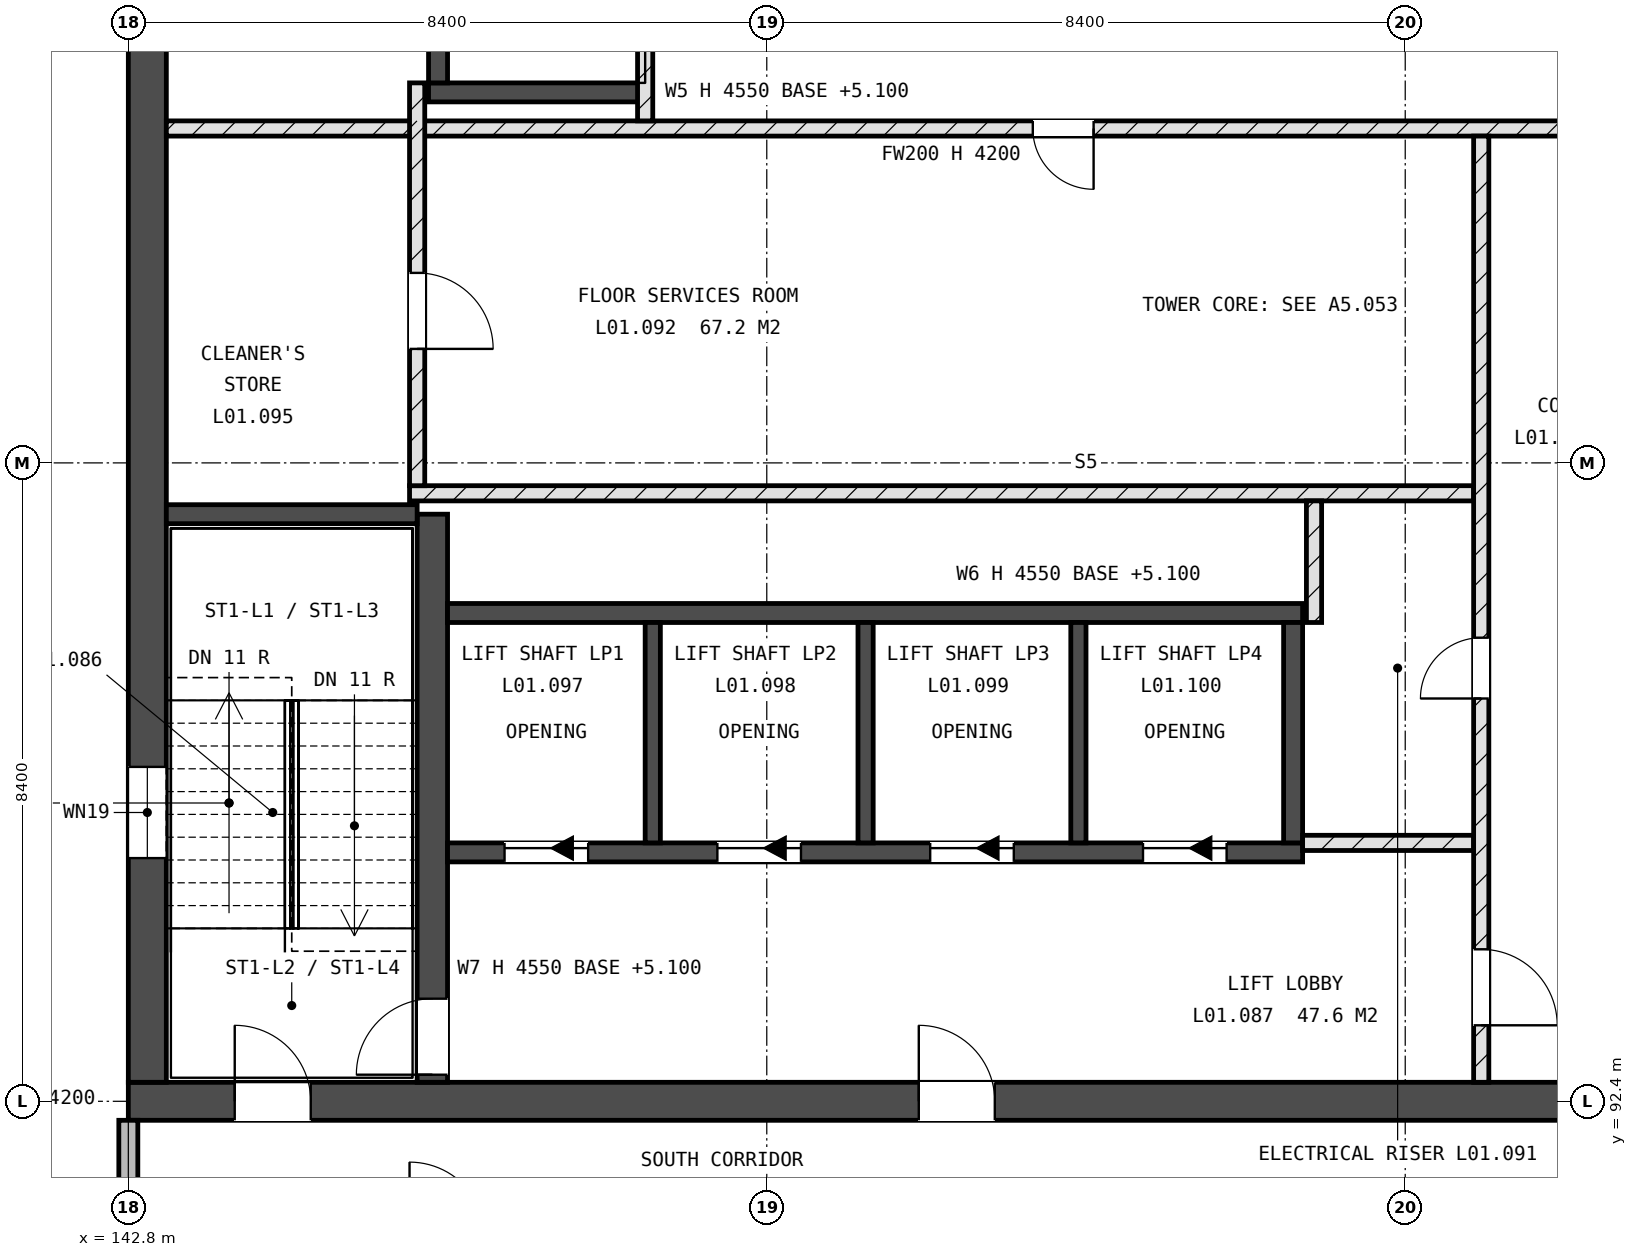
"""IFC4 building model, lengths in metres.
Left out: names, types, materials, properties, quantities, classifications, styles, units other than length and angle.
Written with IfcOpenShell. Run it as: python <this file> out.ifc"""

import sys

from ifc_helpers import new_model, si_unit, direction, frame, frame_2d, origin, place, context, subcontext, project, spatial, rectangle, extrude, element, fill, save


model = new_model("IFC4")
c1 = context("Model", 3, precision=1e-05, world=origin(), true_north=direction((0.0, 1.0)))
c2 = subcontext(c1, "Body", "Model", "MODEL_VIEW")
j1 = project(units=[si_unit("LENGTHUNIT", "METRE"), si_unit("PLANEANGLEUNIT", "RADIAN")], contexts=[c1])
p1 = place(None, origin())
s1 = spatial("IfcSite", under=j1, at=p1, CompositionType="ELEMENT")
p2 = place(p1, origin())
s2 = spatial("IfcBuilding", under=s1, at=p2, CompositionType="ELEMENT")
p3 = place(p2, frame((0.0, 0.0, 5.4)))
s3 = spatial("IfcBuildingStorey", under=s2, at=p3, CompositionType="ELEMENT", Elevation=5.4)
p4 = place(p3, frame((142.8, 92.4, -0.3), z_axis=(0.0, 0.0, 1.0), x_axis=(1.0, 0.0, 0.0)))
e1 = element("IfcWall", 1, at=p4, inside=s3, PredefinedType="SHEAR", context=c2, shape_type="SweptSolid", body=[
    extrude(rectangle(XDim=25.2, YDim=0.5, at=frame_2d((12.6, 0.0))), origin(), (0.0, 0.0, 1.0), 4.55),
])
p5 = place(p4, frame((1.4, 0.0, 0.3)))
e2 = element("IfcOpeningElement", 2, at=p5, cuts=e1, PredefinedType="OPENING", context=c2, shape_type="SweptSolid", body=[
    extrude(rectangle(XDim=1.0, YDim=2.1, at=frame_2d((0.5, 1.05))), frame((0.0, 0.26, 0.0), z_axis=(0.0, -1.0, 0.0), x_axis=(1.0, 0.0, 0.0)), (0.0, 0.0, 1.0), 0.52),
])
p6 = place(p4, frame((19.1, 0.0, 0.3)))
e3 = element("IfcOpeningElement", 3, at=p6, cuts=e1, PredefinedType="OPENING", context=c2, shape_type="SweptSolid", body=[
    extrude(rectangle(XDim=1.0, YDim=2.1, at=frame_2d((0.5, 1.05))), frame((0.0, 0.26, 0.0), z_axis=(0.0, -1.0, 0.0), x_axis=(1.0, 0.0, 0.0)), (0.0, 0.0, 1.0), 0.52),
])
p7 = place(p4, frame((10.4, 0.0, 0.3)))
e4 = element("IfcOpeningElement", 4, at=p7, cuts=e1, PredefinedType="OPENING", context=c2, shape_type="SweptSolid", body=[
    extrude(rectangle(XDim=1.0, YDim=2.1, at=frame_2d((0.5, 1.05))), frame((0.0, 0.26, 0.0), z_axis=(0.0, -1.0, 0.0), x_axis=(1.0, 0.0, 0.0)), (0.0, 0.0, 1.0), 0.52),
])
p8 = place(p3, frame((143.05, 92.65, -0.3), z_axis=(0.0, 0.0, 1.0), x_axis=(0.0, 1.0, 0.0)))
e5 = element("IfcWall", 5, at=p8, inside=s3, PredefinedType="SHEAR", context=c2, shape_type="SweptSolid", body=[
    extrude(rectangle(XDim=16.3, YDim=0.5, at=frame_2d((8.15, 0.0))), origin(), (0.0, 0.0, 1.0), 4.55),
])
p9 = place(p8, frame((2.95, 0.0, 1.9)))
e6 = element("IfcOpeningElement", 6, at=p9, cuts=e5, PredefinedType="OPENING", context=c2, shape_type="SweptSolid", body=[
    extrude(rectangle(XDim=1.2, YDim=0.9, at=frame_2d((0.6, 0.45))), frame((0.0, 0.26, 0.0), z_axis=(0.0, -1.0, 0.0), x_axis=(1.0, 0.0, 0.0)), (0.0, 0.0, 1.0), 0.52),
])
p10 = place(p3, frame((146.8, 92.65, -0.3), z_axis=(0.0, 0.0, 1.0), x_axis=(0.0, 1.0, 0.0)))
e7 = element("IfcWall", 7, at=p10, inside=s3, PredefinedType="SHEAR", context=c2, shape_type="SweptSolid", body=[
    extrude(rectangle(XDim=7.475, YDim=0.4, at=frame_2d((3.738, 0.0))), origin(), (0.0, 0.0, 1.0), 4.55),
])
p11 = place(p10, frame((0.1, 0.0, 0.3)))
e8 = element("IfcOpeningElement", 8, at=p11, cuts=e7, PredefinedType="OPENING", context=c2, shape_type="SweptSolid", body=[
    extrude(rectangle(XDim=1.0, YDim=2.1, at=frame_2d((0.5, 1.05))), frame((0.0, 0.21, 0.0), z_axis=(0.0, -1.0, 0.0), x_axis=(1.0, 0.0, 0.0)), (0.0, 0.0, 1.0), 0.42),
])
p12 = place(p3, frame((143.3, 100.125, -0.3), z_axis=(0.0, 0.0, 1.0), x_axis=(1.0, 0.0, 0.0)))
e9 = element("IfcWall", 9, at=p12, inside=s3, PredefinedType="SHEAR", context=c2, shape_type="SweptSolid", body=[
    extrude(rectangle(XDim=3.3, YDim=0.25, at=frame_2d((1.65, 0.0))), origin(), (0.0, 0.0, 1.0), 4.55),
])
p13 = place(p3, frame((147.0, 95.675, -0.3), z_axis=(0.0, 0.0, 1.0), x_axis=(1.0, 0.0, 0.0)))
e10 = element("IfcWall", 10, at=p13, inside=s3, PredefinedType="SHEAR", context=c2, shape_type="SweptSolid", body=[
    extrude(rectangle(XDim=11.25, YDim=0.25, at=frame_2d((5.625, 0.0))), origin(), (0.0, 0.0, 1.0), 4.55),
])
p14 = place(p13, frame((0.75, 0.0, 0.3)))
e11 = element("IfcOpeningElement", 11, at=p14, cuts=e10, PredefinedType="OPENING", context=c2, shape_type="SweptSolid", body=[
    extrude(rectangle(XDim=1.1, YDim=2.1, at=frame_2d((0.55, 1.05))), frame((0.0, 0.135, 0.0), z_axis=(0.0, -1.0, 0.0), x_axis=(1.0, 0.0, 0.0)), (0.0, 0.0, 1.0), 0.27),
])
p15 = place(p13, frame((3.55, 0.0, 0.3)))
e12 = element("IfcOpeningElement", 12, at=p15, cuts=e10, PredefinedType="OPENING", context=c2, shape_type="SweptSolid", body=[
    extrude(rectangle(XDim=1.1, YDim=2.1, at=frame_2d((0.55, 1.05))), frame((0.0, 0.135, 0.0), z_axis=(0.0, -1.0, 0.0), x_axis=(1.0, 0.0, 0.0)), (0.0, 0.0, 1.0), 0.27),
])
p16 = place(p13, frame((6.35, 0.0, 0.3)))
e13 = element("IfcOpeningElement", 13, at=p16, cuts=e10, PredefinedType="OPENING", context=c2, shape_type="SweptSolid", body=[
    extrude(rectangle(XDim=1.1, YDim=2.1, at=frame_2d((0.55, 1.05))), frame((0.0, 0.135, 0.0), z_axis=(0.0, -1.0, 0.0), x_axis=(1.0, 0.0, 0.0)), (0.0, 0.0, 1.0), 0.27),
])
p17 = place(p13, frame((9.15, 0.0, 0.3)))
e14 = element("IfcOpeningElement", 14, at=p17, cuts=e10, PredefinedType="OPENING", context=c2, shape_type="SweptSolid", body=[
    extrude(rectangle(XDim=1.1, YDim=2.1, at=frame_2d((0.55, 1.05))), frame((0.0, 0.135, 0.0), z_axis=(0.0, -1.0, 0.0), x_axis=(1.0, 0.0, 0.0)), (0.0, 0.0, 1.0), 0.27),
])
p18 = place(p3, frame((147.0, 98.825, -0.3), z_axis=(0.0, 0.0, 1.0), x_axis=(1.0, 0.0, 0.0)))
e15 = element("IfcWall", 15, at=p18, inside=s3, PredefinedType="SHEAR", context=c2, shape_type="SweptSolid", body=[
    extrude(rectangle(XDim=11.25, YDim=0.25, at=frame_2d((5.625, 0.0))), origin(), (0.0, 0.0, 1.0), 4.55),
])
p19 = place(p3, frame((158.125, 95.8, -0.3), z_axis=(0.0, 0.0, 1.0), x_axis=(0.0, 1.0, 0.0)))
e16 = element("IfcWall", 16, at=p19, inside=s3, PredefinedType="SHEAR", context=c2, shape_type="SweptSolid", body=[
    extrude(rectangle(XDim=2.9, YDim=0.25, at=frame_2d((1.45, 0.0))), origin(), (0.0, 0.0, 1.0), 4.55),
])
for number, where, z_axis, x_axis in (
    (17, (149.7, 95.8, -0.3), (0.0, 0.0, 1.0), (0.0, 1.0, 0.0)),
    (18, (152.5, 95.8, -0.3), (0.0, 0.0, 1.0), (0.0, 1.0, 0.0)),
    (19, (155.3, 95.8, -0.3), (0.0, 0.0, 1.0), (0.0, 1.0, 0.0)),
):
    element("IfcWall", number, at=place(p3, frame(where, z_axis=z_axis, x_axis=x_axis)), inside=s3, PredefinedType="SHEAR", context=c2, shape_type="SweptSolid", body=[
        extrude(rectangle(XDim=2.9, YDim=0.2, at=frame_2d((1.45, 0.0))), origin(), (0.0, 0.0, 1.0), 4.55),
    ])
p20 = place(p3, frame((146.75, 105.675, -0.3), z_axis=(0.0, 0.0, 1.0), x_axis=(1.0, 0.0, 0.0)))
e20 = element("IfcWall", 20, at=p20, inside=s3, PredefinedType="SHEAR", context=c2, shape_type="SweptSolid", body=[
    extrude(rectangle(XDim=2.85, YDim=0.25, at=frame_2d((1.425, 0.0))), origin(), (0.0, 0.0, 1.0), 4.55),
])
p21 = place(p3, frame((146.875, 105.8, -0.3), z_axis=(0.0, 0.0, 1.0), x_axis=(0.0, 1.0, 0.0)))
e21 = element("IfcWall", 21, at=p21, inside=s3, PredefinedType="SHEAR", context=c2, shape_type="SweptSolid", body=[
    extrude(rectangle(XDim=2.9, YDim=0.25, at=frame_2d((1.45, 0.0))), origin(), (0.0, 0.0, 1.0), 4.55),
])
p22 = place(p3, frame((142.8, 84.55, 0.0), z_axis=(0.0, 0.0, 1.0), x_axis=(0.0, 1.0, 0.0)))
e22 = element("IfcWall", 22, at=p22, inside=s3, PredefinedType="STANDARD", context=c2, shape_type="SweptSolid", body=[
    extrude(rectangle(XDim=7.6, YDim=0.25, at=frame_2d((3.8, 0.0))), origin(), (0.0, 0.0, 1.0), 4.2),
])
p23 = place(p22, frame((2.15, 0.0, 2.1)))
e23 = element("IfcOpeningElement", 23, at=p23, cuts=e22, PredefinedType="OPENING", context=c2, shape_type="SweptSolid", body=[
    extrude(rectangle(XDim=0.9, YDim=0.6, at=frame_2d((0.45, 0.3))), frame((0.0, 0.135, 0.0), z_axis=(0.0, -1.0, 0.0), x_axis=(1.0, 0.0, 0.0)), (0.0, 0.0, 1.0), 0.27),
])
p24 = place(p3, frame((158.25, 95.8, 0.0), z_axis=(0.0, 0.0, 1.0), x_axis=(1.0, 0.0, 0.0)))
e24 = element("IfcWall", 24, at=p24, inside=s3, PredefinedType="SOLIDWALL", context=c2, shape_type="SweptSolid", body=[
    extrude(rectangle(XDim=2.25, YDim=0.2, at=frame_2d((1.125, 0.0))), origin(), (0.0, 0.0, 1.0), 4.2),
])
p25 = place(p3, frame((146.5, 100.4, 0.0), z_axis=(0.0, 0.0, 1.0), x_axis=(1.0, 0.0, 0.0)))
e25 = element("IfcWall", 25, at=p25, inside=s3, PredefinedType="SOLIDWALL", context=c2, shape_type="SweptSolid", body=[
    extrude(rectangle(XDim=14.0, YDim=0.2, at=frame_2d((7.0, 0.0))), origin(), (0.0, 0.0, 1.0), 4.2),
])
p26 = place(p3, frame((143.3, 105.2, 0.0), z_axis=(0.0, 0.0, 1.0), x_axis=(1.0, 0.0, 0.0)))
e26 = element("IfcWall", 26, at=p26, inside=s3, PredefinedType="SOLIDWALL", context=c2, shape_type="SweptSolid", body=[
    extrude(rectangle(XDim=20.65, YDim=0.2, at=frame_2d((10.325, 0.0))), origin(), (0.0, 0.0, 1.0), 4.2),
])
p27 = place(p26, frame((11.4, 0.0, 0.0)))
e27 = element("IfcOpeningElement", 27, at=p27, cuts=e26, PredefinedType="OPENING", context=c2, shape_type="SweptSolid", body=[
    extrude(rectangle(XDim=0.8, YDim=2.1, at=frame_2d((0.4, 1.05))), frame((0.0, 0.11, 0.0), z_axis=(0.0, -1.0, 0.0), x_axis=(1.0, 0.0, 0.0)), (0.0, 0.0, 1.0), 0.22),
])
p28 = place(p26, frame((18.7, 0.0, 0.0)))
e28 = element("IfcOpeningElement", 28, at=p28, cuts=e26, PredefinedType="OPENING", context=c2, shape_type="SweptSolid", body=[
    extrude(rectangle(XDim=1.0, YDim=2.1, at=frame_2d((0.5, 1.05))), frame((0.0, 0.11, 0.0), z_axis=(0.0, -1.0, 0.0), x_axis=(1.0, 0.0, 0.0)), (0.0, 0.0, 1.0), 0.22),
])
p29 = place(p3, frame((146.6, 100.5, 0.0), z_axis=(0.0, 0.0, 1.0), x_axis=(0.0, 1.0, 0.0)))
e29 = element("IfcWall", 29, at=p29, inside=s3, PredefinedType="SOLIDWALL", context=c2, shape_type="SweptSolid", body=[
    extrude(rectangle(XDim=5.3, YDim=0.2, at=frame_2d((2.65, 0.0))), origin(), (0.0, 0.0, 1.0), 4.2),
])
p30 = place(p29, frame((1.8, 0.0, 0.0)))
e30 = element("IfcOpeningElement", 30, at=p30, cuts=e29, PredefinedType="OPENING", context=c2, shape_type="SweptSolid", body=[
    extrude(rectangle(XDim=1.0, YDim=2.1, at=frame_2d((0.5, 1.05))), frame((0.0, 0.11, 0.0), z_axis=(0.0, -1.0, 0.0), x_axis=(1.0, 0.0, 0.0)), (0.0, 0.0, 1.0), 0.22),
])
p31 = place(p3, frame((149.6, 105.3, 0.0), z_axis=(0.0, 0.0, 1.0), x_axis=(0.0, 1.0, 0.0)))
e31 = element("IfcWall", 31, at=p31, inside=s3, PredefinedType="SOLIDWALL", context=c2, shape_type="SweptSolid", body=[
    extrude(rectangle(XDim=3.65, YDim=0.2, at=frame_2d((1.825, 0.0))), origin(), (0.0, 0.0, 1.0), 4.2),
])
p32 = place(p31, frame((1.4, 0.0, 0.0)))
e32 = element("IfcOpeningElement", 32, at=p32, cuts=e31, PredefinedType="OPENING", context=c2, shape_type="SweptSolid", body=[
    extrude(rectangle(XDim=1.1, YDim=2.1, at=frame_2d((0.55, 1.05))), frame((0.0, 0.11, 0.0), z_axis=(0.0, -1.0, 0.0), x_axis=(1.0, 0.0, 0.0)), (0.0, 0.0, 1.0), 0.22),
])
p33 = place(p3, frame((158.4, 98.7, 0.0), z_axis=(0.0, 0.0, 1.0), x_axis=(0.0, 1.0, 0.0)))
e33 = element("IfcWall", 33, at=p33, inside=s3, PredefinedType="SOLIDWALL", context=c2, shape_type="SweptSolid", body=[
    extrude(rectangle(XDim=1.6, YDim=0.2, at=frame_2d((0.8, 0.0))), origin(), (0.0, 0.0, 1.0), 4.2),
])
p34 = place(p3, frame((160.6, 92.65, 0.0), z_axis=(0.0, 0.0, 1.0), x_axis=(0.0, 1.0, 0.0)))
e34 = element("IfcWall", 34, at=p34, inside=s3, PredefinedType="SOLIDWALL", context=c2, shape_type="SweptSolid", body=[
    extrude(rectangle(XDim=12.45, YDim=0.2, at=frame_2d((6.225, 0.0))), origin(), (0.0, 0.0, 1.0), 4.2),
])
p35 = place(p34, frame((5.05, 0.0, 0.0)))
e35 = element("IfcOpeningElement", 35, at=p35, cuts=e34, PredefinedType="OPENING", context=c2, shape_type="SweptSolid", body=[
    extrude(rectangle(XDim=0.8, YDim=2.1, at=frame_2d((0.4, 1.05))), frame((0.0, 0.11, 0.0), z_axis=(0.0, -1.0, 0.0), x_axis=(1.0, 0.0, 0.0)), (0.0, 0.0, 1.0), 0.22),
])
p36 = place(p34, frame((0.75, 0.0, 0.0)))
e36 = element("IfcOpeningElement", 36, at=p36, cuts=e34, PredefinedType="OPENING", context=c2, shape_type="SweptSolid", body=[
    extrude(rectangle(XDim=1.0, YDim=2.1, at=frame_2d((0.5, 1.05))), frame((0.0, 0.11, 0.0), z_axis=(0.0, -1.0, 0.0), x_axis=(1.0, 0.0, 0.0)), (0.0, 0.0, 1.0), 0.22),
])
p37 = place(p9, origin())
e37 = element("IfcWindow", 37, at=p37, inside=s3, PartitioningType="SINGLE_PANEL", PredefinedType="WINDOW", context=c2, shape_type="SweptSolid", body=[
    extrude(rectangle(XDim=1.2, YDim=0.9, at=frame_2d((0.6, 0.45))), frame((0.0, 0.03, 0.0), z_axis=(0.0, -1.0, 0.0), x_axis=(1.0, 0.0, 0.0)), (0.0, 0.0, 1.0), 0.06),
])
fill(e6, e37)
p38 = place(p14, origin())
e38 = element("IfcDoor", 38, at=p38, inside=s3, OperationType="SLIDING_TO_LEFT", PredefinedType="DOOR", context=c2, shape_type="SweptSolid", body=[
    extrude(rectangle(XDim=1.1, YDim=2.1, at=frame_2d((0.55, 1.05))), frame((0.0, 0.025, 0.0), z_axis=(0.0, -1.0, 0.0), x_axis=(1.0, 0.0, 0.0)), (0.0, 0.0, 1.0), 0.05),
])
fill(e11, e38)
p39 = place(p15, origin())
e39 = element("IfcDoor", 39, at=p39, inside=s3, OperationType="SLIDING_TO_LEFT", PredefinedType="DOOR", context=c2, shape_type="SweptSolid", body=[
    extrude(rectangle(XDim=1.1, YDim=2.1, at=frame_2d((0.55, 1.05))), frame((0.0, 0.025, 0.0), z_axis=(0.0, -1.0, 0.0), x_axis=(1.0, 0.0, 0.0)), (0.0, 0.0, 1.0), 0.05),
])
fill(e12, e39)
p40 = place(p16, origin())
e40 = element("IfcDoor", 40, at=p40, inside=s3, OperationType="SLIDING_TO_LEFT", PredefinedType="DOOR", context=c2, shape_type="SweptSolid", body=[
    extrude(rectangle(XDim=1.1, YDim=2.1, at=frame_2d((0.55, 1.05))), frame((0.0, 0.025, 0.0), z_axis=(0.0, -1.0, 0.0), x_axis=(1.0, 0.0, 0.0)), (0.0, 0.0, 1.0), 0.05),
])
fill(e13, e40)
p41 = place(p17, origin())
e41 = element("IfcDoor", 41, at=p41, inside=s3, OperationType="SLIDING_TO_LEFT", PredefinedType="DOOR", context=c2, shape_type="SweptSolid", body=[
    extrude(rectangle(XDim=1.1, YDim=2.1, at=frame_2d((0.55, 1.05))), frame((0.0, 0.025, 0.0), z_axis=(0.0, -1.0, 0.0), x_axis=(1.0, 0.0, 0.0)), (0.0, 0.0, 1.0), 0.05),
])
fill(e14, e41)
p42 = place(p5, origin())
e42 = element("IfcDoor", 42, at=p42, inside=s3, OperationType="SINGLE_SWING_RIGHT", PredefinedType="DOOR", context=c2, shape_type="SweptSolid", body=[
    extrude(rectangle(XDim=1.0, YDim=2.1, at=frame_2d((0.5, 1.05))), frame((0.0, 0.025, 0.0), z_axis=(0.0, -1.0, 0.0), x_axis=(1.0, 0.0, 0.0)), (0.0, 0.0, 1.0), 0.05),
])
fill(e2, e42)
p43 = place(p11, origin())
e43 = element("IfcDoor", 43, at=p43, inside=s3, OperationType="SINGLE_SWING_RIGHT", PredefinedType="DOOR", context=c2, shape_type="SweptSolid", body=[
    extrude(rectangle(XDim=1.0, YDim=2.1, at=frame_2d((0.5, 1.05))), frame((0.0, 0.025, 0.0), z_axis=(0.0, -1.0, 0.0), x_axis=(1.0, 0.0, 0.0)), (0.0, 0.0, 1.0), 0.05),
])
fill(e8, e43)
p44 = place(p35, origin())
e44 = element("IfcDoor", 44, at=p44, inside=s3, OperationType="SINGLE_SWING_RIGHT", PredefinedType="DOOR", context=c2, shape_type="SweptSolid", body=[
    extrude(rectangle(XDim=0.8, YDim=2.1, at=frame_2d((0.4, 1.05))), frame((0.0, 0.025, 0.0), z_axis=(0.0, -1.0, 0.0), x_axis=(1.0, 0.0, 0.0)), (0.0, 0.0, 1.0), 0.05),
])
fill(e35, e44)
p45 = place(p27, origin())
e45 = element("IfcDoor", 45, at=p45, inside=s3, OperationType="SINGLE_SWING_RIGHT", PredefinedType="DOOR", context=c2, shape_type="SweptSolid", body=[
    extrude(rectangle(XDim=0.8, YDim=2.1, at=frame_2d((0.4, 1.05))), frame((0.0, 0.025, 0.0), z_axis=(0.0, -1.0, 0.0), x_axis=(1.0, 0.0, 0.0)), (0.0, 0.0, 1.0), 0.05),
])
fill(e27, e45)
p46 = place(p30, origin())
e46 = element("IfcDoor", 46, at=p46, inside=s3, OperationType="SINGLE_SWING_LEFT", PredefinedType="DOOR", context=c2, shape_type="SweptSolid", body=[
    extrude(rectangle(XDim=1.0, YDim=2.1, at=frame_2d((0.5, 1.05))), frame((0.0, 0.025, 0.0), z_axis=(0.0, -1.0, 0.0), x_axis=(1.0, 0.0, 0.0)), (0.0, 0.0, 1.0), 0.05),
])
fill(e30, e46)
p47 = place(p7, origin())
e47 = element("IfcDoor", 47, at=p47, inside=s3, OperationType="SINGLE_SWING_RIGHT", PredefinedType="DOOR", context=c2, shape_type="SweptSolid", body=[
    extrude(rectangle(XDim=1.0, YDim=2.1, at=frame_2d((0.5, 1.05))), frame((0.0, 0.025, 0.0), z_axis=(0.0, -1.0, 0.0), x_axis=(1.0, 0.0, 0.0)), (0.0, 0.0, 1.0), 0.05),
])
fill(e4, e47)
p48 = place(p36, origin())
e48 = element("IfcDoor", 48, at=p48, inside=s3, OperationType="SINGLE_SWING_LEFT", PredefinedType="DOOR", context=c2, shape_type="SweptSolid", body=[
    extrude(rectangle(XDim=1.0, YDim=2.1, at=frame_2d((0.5, 1.05))), frame((0.0, 0.025, 0.0), z_axis=(0.0, -1.0, 0.0), x_axis=(1.0, 0.0, 0.0)), (0.0, 0.0, 1.0), 0.05),
])
fill(e36, e48)
save(model, sys.argv[1])
